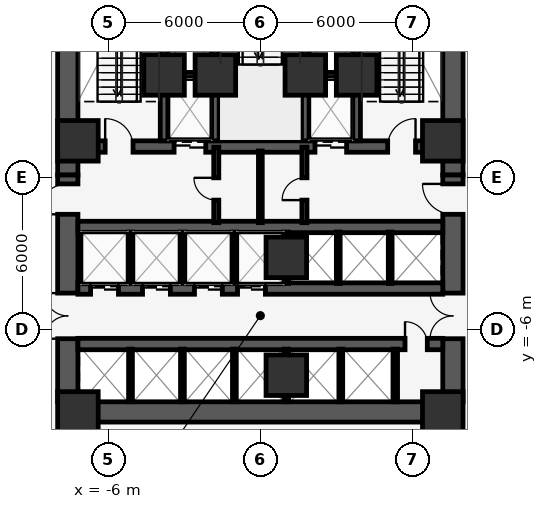
"""IFC4 building model, lengths in metres.
Left out: names, types, materials, properties, quantities, classifications, styles, units other than length and angle.
Written with IfcOpenShell. Run it as: python <this file> out.ifc"""

import sys

from ifc_helpers import new_model, si_unit, direction, frame, frame_2d, origin, origin_2d, place, context, subcontext, project, spatial, rectangle, extrude, element, fill, save


model = new_model("IFC4")
c1 = context("Model", 3, precision=1e-05, world=origin(), true_north=direction((0.0, 1.0)))
c2 = subcontext(c1, "Body", "Model", "MODEL_VIEW")
j1 = project(units=[si_unit("LENGTHUNIT", "METRE"), si_unit("PLANEANGLEUNIT", "RADIAN")], contexts=[c1])
p1 = place(None, origin())
s1 = spatial("IfcSite", under=j1, at=p1, CompositionType="ELEMENT")
p2 = place(p1, origin())
s2 = spatial("IfcBuilding", under=s1, at=p2, CompositionType="ELEMENT")
p3 = place(p2, frame((0.0, 0.0, 34.4)))
s3 = spatial("IfcBuildingStorey", under=s2, at=p3, CompositionType="ELEMENT", Elevation=34.4)
p4 = place(p3, frame((-7.2, 1.225, 0.0), z_axis=(0.0, 0.0, 1.0), x_axis=(1.0, 0.0, 0.0)))
e1 = element("IfcWall", 1, at=p4, inside=s3, PredefinedType="SHEAR", context=c2, shape_type="SweptSolid", body=[
    extrude(rectangle(XDim=14.4, YDim=0.45, at=frame_2d((7.2, 0.0))), origin(), (0.0, 0.0, 1.0), 3.75),
])
p5 = place(p4, frame((3.795, 0.0, 0.0)))
e2 = element("IfcOpeningElement", 2, at=p5, cuts=e1, PredefinedType="OPENING", context=c2, shape_type="SweptSolid", body=[
    extrude(rectangle(XDim=1.25, YDim=2.25, at=frame_2d((0.625, 1.125))), frame((0.0, 0.235, 0.0), z_axis=(0.0, -1.0, 0.0), x_axis=(1.0, 0.0, 0.0)), (0.0, 0.0, 1.0), 0.47),
])
p6 = place(p4, frame((9.355, 0.0, 0.0)))
e3 = element("IfcOpeningElement", 3, at=p6, cuts=e1, PredefinedType="OPENING", context=c2, shape_type="SweptSolid", body=[
    extrude(rectangle(XDim=1.25, YDim=2.25, at=frame_2d((0.625, 1.125))), frame((0.0, 0.235, 0.0), z_axis=(0.0, -1.0, 0.0), x_axis=(1.0, 0.0, 0.0)), (0.0, 0.0, 1.0), 0.47),
])
p7 = place(p4, frame((1.075, 0.0, 0.0)))
e4 = element("IfcOpeningElement", 4, at=p7, cuts=e1, PredefinedType="OPENING", context=c2, shape_type="SweptSolid", body=[
    extrude(rectangle(XDim=1.1, YDim=2.15, at=frame_2d((0.55, 1.075))), frame((0.0, 0.235, 0.0), z_axis=(0.0, -1.0, 0.0), x_axis=(1.0, 0.0, 0.0)), (0.0, 0.0, 1.0), 0.47),
])
p8 = place(p4, frame((12.225, 0.0, 0.0)))
e5 = element("IfcOpeningElement", 5, at=p8, cuts=e1, PredefinedType="OPENING", context=c2, shape_type="SweptSolid", body=[
    extrude(rectangle(XDim=1.1, YDim=2.15, at=frame_2d((0.55, 1.075))), frame((0.0, 0.235, 0.0), z_axis=(0.0, -1.0, 0.0), x_axis=(1.0, 0.0, 0.0)), (0.0, 0.0, 1.0), 0.47),
])
for number, where, z_axis, x_axis in (
    (6, (-3.8, 1.45, 0.0), (0.0, 0.0, 1.0), (0.0, 1.0, 0.0)),
    (7, (-1.775, 1.45, 0.0), (0.0, 0.0, 1.0), (0.0, 1.0, 0.0)),
    (8, (1.775, 1.45, 0.0), (0.0, 0.0, 1.0), (0.0, 1.0, 0.0)),
    (9, (3.8, 1.45, 0.0), (0.0, 0.0, 1.0), (0.0, 1.0, 0.0)),
):
    element("IfcWall", number, at=place(p3, frame(where, z_axis=z_axis, x_axis=x_axis)), inside=s3, PredefinedType="SHEAR", context=c2, shape_type="SweptSolid", body=[
        extrude(rectangle(XDim=7.7, YDim=0.3, at=frame_2d((3.85, 0.0))), origin(), (0.0, 0.0, 1.0), 3.75),
    ])
for number, where, z_axis, x_axis in (
    (10, (-7.6, 0.1, 0.0), (0.0, 0.0, 1.0), (0.0, 1.0, 0.0)),
    (11, (7.6, 0.1, 0.0), (0.0, 0.0, 1.0), (0.0, 1.0, 0.0)),
):
    element("IfcWall", number, at=place(p3, frame(where, z_axis=z_axis, x_axis=x_axis)), inside=s3, PredefinedType="SHEAR", context=c2, shape_type="SweptSolid", body=[
        extrude(rectangle(XDim=9.05, YDim=0.8, at=frame_2d((4.525, 0.0))), origin(), (0.0, 0.0, 1.0), 3.75),
    ])
p9 = place(p3, frame((-7.6, -8.85, 0.0), z_axis=(0.0, 0.0, 1.0), x_axis=(0.0, 1.0, 0.0)))
e12 = element("IfcWall", 12, at=p9, inside=s3, PredefinedType="SHEAR", context=c2, shape_type="SweptSolid", body=[
    extrude(rectangle(XDim=8.95, YDim=0.8, at=frame_2d((4.475, 0.0))), origin(), (0.0, 0.0, 1.0), 3.75),
])
p10 = place(p9, frame((2.49, 0.0, 0.0)))
e13 = element("IfcOpeningElement", 13, at=p10, cuts=e12, PredefinedType="OPENING", context=c2, shape_type="SweptSolid", body=[
    extrude(rectangle(XDim=1.8, YDim=2.2, at=frame_2d((0.9, 1.1))), frame((0.0, 0.41, 0.0), z_axis=(0.0, -1.0, 0.0), x_axis=(1.0, 0.0, 0.0)), (0.0, 0.0, 1.0), 0.82),
])
p11 = place(p9, frame((7.4, 0.0, 0.0)))
e14 = element("IfcOpeningElement", 14, at=p11, cuts=e12, PredefinedType="OPENING", context=c2, shape_type="SweptSolid", body=[
    extrude(rectangle(XDim=1.2, YDim=2.15, at=frame_2d((0.6, 1.075))), frame((0.0, 0.41, 0.0), z_axis=(0.0, -1.0, 0.0), x_axis=(1.0, 0.0, 0.0)), (0.0, 0.0, 1.0), 0.82),
])
p12 = place(p3, frame((7.6, -8.85, 0.0), z_axis=(0.0, 0.0, 1.0), x_axis=(0.0, 1.0, 0.0)))
e15 = element("IfcWall", 15, at=p12, inside=s3, PredefinedType="SHEAR", context=c2, shape_type="SweptSolid", body=[
    extrude(rectangle(XDim=8.95, YDim=0.8, at=frame_2d((4.475, 0.0))), origin(), (0.0, 0.0, 1.0), 3.75),
])
p13 = place(p12, frame((2.49, 0.0, 0.0)))
e16 = element("IfcOpeningElement", 16, at=p13, cuts=e15, PredefinedType="OPENING", context=c2, shape_type="SweptSolid", body=[
    extrude(rectangle(XDim=1.8, YDim=2.2, at=frame_2d((0.9, 1.1))), frame((0.0, 0.41, 0.0), z_axis=(0.0, -1.0, 0.0), x_axis=(1.0, 0.0, 0.0)), (0.0, 0.0, 1.0), 0.82),
])
p14 = place(p12, frame((7.4, 0.0, 0.0)))
e17 = element("IfcOpeningElement", 17, at=p14, cuts=e15, PredefinedType="OPENING", context=c2, shape_type="SweptSolid", body=[
    extrude(rectangle(XDim=1.2, YDim=2.15, at=frame_2d((0.6, 1.075))), frame((0.0, 0.41, 0.0), z_axis=(0.0, -1.0, 0.0), x_axis=(1.0, 0.0, 0.0)), (0.0, 0.0, 1.0), 0.82),
])
p15 = place(p3, frame((-7.6, -9.25, 0.0), z_axis=(0.0, 0.0, 1.0), x_axis=(1.0, 0.0, 0.0)))
e18 = element("IfcWall", 18, at=p15, inside=s3, PredefinedType="SHEAR", context=c2, shape_type="SweptSolid", body=[
    extrude(rectangle(XDim=15.2, YDim=0.8, at=frame_2d((7.6, 0.0))), origin(), (0.0, 0.0, 1.0), 3.75),
])
p16 = place(p3, frame((-7.2, -1.95, 0.0), z_axis=(0.0, 0.0, 1.0), x_axis=(1.0, 0.0, 0.0)))
e19 = element("IfcWall", 19, at=p16, inside=s3, PredefinedType="SHEAR", context=c2, shape_type="SweptSolid", body=[
    extrude(rectangle(XDim=14.4, YDim=0.45, at=frame_2d((7.2, 0.0))), origin(), (0.0, 0.0, 1.0), 3.75),
])
p17 = place(p3, frame((-7.2, -4.38, 0.0), z_axis=(0.0, 0.0, 1.0), x_axis=(1.0, 0.0, 0.0)))
e20 = element("IfcWall", 20, at=p17, inside=s3, PredefinedType="SHEAR", context=c2, shape_type="SweptSolid", body=[
    extrude(rectangle(XDim=14.4, YDim=0.45, at=frame_2d((7.2, 0.0))), origin(), (0.0, 0.0, 1.0), 3.75),
])
p18 = place(p17, frame((0.5, 0.0, 0.0)))
e21 = element("IfcOpeningElement", 21, at=p18, cuts=e20, PredefinedType="OPENING", context=c2, shape_type="SweptSolid", body=[
    extrude(rectangle(XDim=1.1, YDim=2.2, at=frame_2d((0.55, 1.1))), frame((0.0, 0.235, 0.0), z_axis=(0.0, -1.0, 0.0), x_axis=(1.0, 0.0, 0.0)), (0.0, 0.0, 1.0), 0.47),
])
p19 = place(p17, frame((2.55, 0.0, 0.0)))
e22 = element("IfcOpeningElement", 22, at=p19, cuts=e20, PredefinedType="OPENING", context=c2, shape_type="SweptSolid", body=[
    extrude(rectangle(XDim=1.1, YDim=2.2, at=frame_2d((0.55, 1.1))), frame((0.0, 0.235, 0.0), z_axis=(0.0, -1.0, 0.0), x_axis=(1.0, 0.0, 0.0)), (0.0, 0.0, 1.0), 0.47),
])
p20 = place(p17, frame((4.6, 0.0, 0.0)))
e23 = element("IfcOpeningElement", 23, at=p20, cuts=e20, PredefinedType="OPENING", context=c2, shape_type="SweptSolid", body=[
    extrude(rectangle(XDim=1.1, YDim=2.2, at=frame_2d((0.55, 1.1))), frame((0.0, 0.235, 0.0), z_axis=(0.0, -1.0, 0.0), x_axis=(1.0, 0.0, 0.0)), (0.0, 0.0, 1.0), 0.47),
])
p21 = place(p17, frame((6.3, 0.0, 0.0)))
e24 = element("IfcOpeningElement", 24, at=p21, cuts=e20, PredefinedType="OPENING", context=c2, shape_type="SweptSolid", body=[
    extrude(rectangle(XDim=1.1, YDim=2.2, at=frame_2d((0.55, 1.1))), frame((0.0, 0.235, 0.0), z_axis=(0.0, -1.0, 0.0), x_axis=(1.0, 0.0, 0.0)), (0.0, 0.0, 1.0), 0.47),
])
p22 = place(p3, frame((-7.2, -6.57, 0.0), z_axis=(0.0, 0.0, 1.0), x_axis=(1.0, 0.0, 0.0)))
e25 = element("IfcWall", 25, at=p22, inside=s3, PredefinedType="SHEAR", context=c2, shape_type="SweptSolid", body=[
    extrude(rectangle(XDim=14.4, YDim=0.45, at=frame_2d((7.2, 0.0))), origin(), (0.0, 0.0, 1.0), 3.75),
])
p23 = place(p22, frame((12.91, 0.0, 0.0)))
e26 = element("IfcOpeningElement", 26, at=p23, cuts=e25, PredefinedType="OPENING", context=c2, shape_type="SweptSolid", body=[
    extrude(rectangle(XDim=0.88, YDim=2.15, at=frame_2d((0.44, 1.075))), frame((0.0, 0.235, 0.0), z_axis=(0.0, -1.0, 0.0), x_axis=(1.0, 0.0, 0.0)), (0.0, 0.0, 1.0), 0.47),
])
for number, where, z_axis, x_axis in (
    (27, (-7.2, -9.25, 0.0), (0.0, 0.0, 1.0), (1.0, 0.0, 0.0)),
    (28, (7.2, -9.25, 0.0), (0.0, 0.0, 1.0), (1.0, 0.0, 0.0)),
    (29, (7.2, 1.45, 0.0), (0.0, 0.0, 1.0), (1.0, 0.0, 0.0)),
    (30, (-7.2, 1.45, 0.0), (0.0, 0.0, 1.0), (1.0, 0.0, 0.0)),
    (31, (-3.8, 4.05, 0.0), (0.0, 0.0, 1.0), (1.0, 0.0, 0.0)),
    (32, (3.8, 4.05, 0.0), (0.0, 0.0, 1.0), (1.0, 0.0, 0.0)),
    (33, (-1.775, 4.05, 0.0), (0.0, 0.0, 1.0), (1.0, 0.0, 0.0)),
    (34, (1.775, 4.05, 0.0), (0.0, 0.0, 1.0), (1.0, 0.0, 0.0)),
    (35, (1.025, -3.15, 0.0), (0.0, 0.0, 1.0), (1.0, 0.0, 0.0)),
    (36, (1.025, -7.8, 0.0), (0.0, 0.0, 1.0), (1.0, 0.0, 0.0)),
):
    element("IfcColumn", number, at=place(p3, frame(where, z_axis=z_axis, x_axis=x_axis)), inside=s3, PredefinedType="COLUMN", context=c2, shape_type="SweptSolid", body=[
        extrude(rectangle(XDim=1.6, YDim=1.6, at=origin_2d()), origin(), (0.0, 0.0, 1.0), 4.0),
    ])
p24 = place(p3, frame((4.923, 41.122, 0.0), z_axis=(0.0, 0.0, 1.0), x_axis=(0.504213113214, -0.863579258935, 0.0)))
e37 = element("IfcWall", 37, at=p24, inside=s3, PredefinedType="STANDARD", context=c2, shape_type="SweptSolid", body=[
    extrude(rectangle(XDim=67.041, YDim=0.32, at=frame_2d((33.521, 0.0))), origin(), (0.0, 0.0, 1.0), 3.75),
])
p25 = place(p24, frame((33.021, 0.0, 0.0)))
e38 = element("IfcOpeningElement", 38, at=p25, cuts=e37, PredefinedType="OPENING", context=c2, shape_type="SweptSolid", body=[
    extrude(rectangle(XDim=1.0, YDim=2.15, at=frame_2d((0.5, 1.075))), frame((0.0, 0.17, 0.0), z_axis=(0.0, -1.0, 0.0), x_axis=(1.0, 0.0, 0.0)), (0.0, 0.0, 1.0), 0.34),
])
p26 = place(p3, frame((-38.726, -16.773, 0.0), z_axis=(0.0, 0.0, 1.0), x_axis=(0.504213113214, 0.863579258935, 0.0)))
e39 = element("IfcWall", 39, at=p26, inside=s3, PredefinedType="STANDARD", context=c2, shape_type="SweptSolid", body=[
    extrude(rectangle(XDim=67.041, YDim=0.32, at=frame_2d((33.521, 0.0))), origin(), (0.0, 0.0, 1.0), 3.75),
])
p27 = place(p26, frame((33.021, 0.0, 0.0)))
e40 = element("IfcOpeningElement", 40, at=p27, cuts=e39, PredefinedType="OPENING", context=c2, shape_type="SweptSolid", body=[
    extrude(rectangle(XDim=1.0, YDim=2.15, at=frame_2d((0.5, 1.075))), frame((0.0, 0.17, 0.0), z_axis=(0.0, -1.0, 0.0), x_axis=(1.0, 0.0, 0.0)), (0.0, 0.0, 1.0), 0.34),
])
for number, where, z_axis, x_axis in (
    (41, (-3.65, 4.05, 0.0), (0.0, 0.0, 1.0), (1.0, 0.0, 0.0)),
    (42, (1.92, 4.05, 0.0), (0.0, 0.0, 1.0), (1.0, 0.0, 0.0)),
):
    element("IfcWall", number, at=place(p3, frame(where, z_axis=z_axis, x_axis=x_axis)), inside=s3, PredefinedType="PARTITIONING", context=c2, shape_type="SweptSolid", body=[
        extrude(rectangle(XDim=1.73, YDim=0.2, at=frame_2d((0.865, 0.0))), origin(), (0.0, 0.0, 1.0), 3.75),
    ])
for number, where, z_axis, x_axis in (
    (43, (-5.125, -4.18, 0.0), (0.0, 0.0, 1.0), (0.0, 1.0, 0.0)),
    (44, (-3.075, -4.18, 0.0), (0.0, 0.0, 1.0), (0.0, 1.0, 0.0)),
    (45, (-1.025, -4.18, 0.0), (0.0, 0.0, 1.0), (0.0, 1.0, 0.0)),
):
    element("IfcWall", number, at=place(p3, frame(where, z_axis=z_axis, x_axis=x_axis)), inside=s3, PredefinedType="PARTITIONING", context=c2, shape_type="SweptSolid", body=[
        extrude(rectangle(XDim=2.03, YDim=0.15, at=frame_2d((1.015, 0.0))), origin(), (0.0, 0.0, 1.0), 3.75),
    ])
p28 = place(p3, frame((1.025, -4.18, 0.0), z_axis=(0.0, 0.0, 1.0), x_axis=(0.0, 1.0, 0.0)))
e46 = element("IfcWall", 46, at=p28, inside=s3, PredefinedType="PARTITIONING", context=c2, shape_type="SweptSolid", body=[
    extrude(rectangle(XDim=2.03, YDim=0.18, at=frame_2d((1.015, 0.0))), origin(), (0.0, 0.0, 1.0), 2.798),
])
for number, where, z_axis, x_axis in (
    (47, (3.075, -4.18, 0.0), (0.0, 0.0, 1.0), (0.0, 1.0, 0.0)),
    (48, (5.125, -4.18, 0.0), (0.0, 0.0, 1.0), (0.0, 1.0, 0.0)),
):
    element("IfcWall", number, at=place(p3, frame(where, z_axis=z_axis, x_axis=x_axis)), inside=s3, PredefinedType="PARTITIONING", context=c2, shape_type="SweptSolid", body=[
        extrude(rectangle(XDim=2.03, YDim=0.15, at=frame_2d((1.015, 0.0))), origin(), (0.0, 0.0, 1.0), 3.75),
    ])
for number, where, z_axis, x_axis in (
    (49, (-5.125, -8.85, 0.0), (0.0, 0.0, 1.0), (0.0, 1.0, 0.0)),
    (50, (-3.075, -8.85, 0.0), (0.0, 0.0, 1.0), (0.0, 1.0, 0.0)),
    (51, (-1.025, -8.85, 0.0), (0.0, 0.0, 1.0), (0.0, 1.0, 0.0)),
):
    element("IfcWall", number, at=place(p3, frame(where, z_axis=z_axis, x_axis=x_axis)), inside=s3, PredefinedType="PARTITIONING", context=c2, shape_type="SweptSolid", body=[
        extrude(rectangle(XDim=2.08, YDim=0.15, at=frame_2d((1.04, 0.0))), origin(), (0.0, 0.0, 1.0), 3.75),
    ])
p29 = place(p3, frame((1.025, -8.85, 0.0), z_axis=(0.0, 0.0, 1.0), x_axis=(0.0, 1.0, 0.0)))
e52 = element("IfcWall", 52, at=p29, inside=s3, PredefinedType="PARTITIONING", context=c2, shape_type="SweptSolid", body=[
    extrude(rectangle(XDim=2.08, YDim=0.18, at=frame_2d((1.04, 0.0))), origin(), (0.0, 0.0, 1.0), 2.798),
])
p30 = place(p3, frame((3.175, -8.85, 0.0), z_axis=(0.0, 0.0, 1.0), x_axis=(0.0, 1.0, 0.0)))
e53 = element("IfcWall", 53, at=p30, inside=s3, PredefinedType="PARTITIONING", context=c2, shape_type="SweptSolid", body=[
    extrude(rectangle(XDim=2.08, YDim=0.15, at=frame_2d((1.04, 0.0))), origin(), (0.0, 0.0, 1.0), 3.75),
])
p31 = place(p3, frame((5.325, -8.85, 0.0), z_axis=(0.0, 0.0, 1.0), x_axis=(0.0, 1.0, 0.0)))
e54 = element("IfcWall", 54, at=p31, inside=s3, PredefinedType="PARTITIONING", context=c2, shape_type="SweptSolid", body=[
    extrude(rectangle(XDim=2.08, YDim=0.18, at=frame_2d((1.04, 0.0))), origin(), (0.0, 0.0, 1.0), 3.75),
])
p32 = place(p3, frame((-1.74, -1.78, 0.0), z_axis=(0.0, 0.0, 1.0), x_axis=(0.0, 1.0, 0.0)))
e55 = element("IfcWall", 55, at=p32, inside=s3, PredefinedType="PARTITIONING", context=c2, shape_type="SweptSolid", body=[
    extrude(rectangle(XDim=2.98, YDim=0.2, at=frame_2d((1.49, 0.0))), origin(), (0.0, 0.0, 1.0), 3.75),
])
p33 = place(p32, frame((0.89, 0.0, 0.0)))
e56 = element("IfcOpeningElement", 56, at=p33, cuts=e55, PredefinedType="OPENING", context=c2, shape_type="SweptSolid", body=[
    extrude(rectangle(XDim=0.88, YDim=2.15, at=frame_2d((0.44, 1.075))), frame((0.0, 0.11, 0.0), z_axis=(0.0, -1.0, 0.0), x_axis=(1.0, 0.0, 0.0)), (0.0, 0.0, 1.0), 0.22),
])
p34 = place(p3, frame((1.74, -1.78, 0.0), z_axis=(0.0, 0.0, 1.0), x_axis=(0.0, 1.0, 0.0)))
e57 = element("IfcWall", 57, at=p34, inside=s3, PredefinedType="PARTITIONING", context=c2, shape_type="SweptSolid", body=[
    extrude(rectangle(XDim=2.98, YDim=0.2, at=frame_2d((1.49, 0.0))), origin(), (0.0, 0.0, 1.0), 3.75),
])
p35 = place(p34, frame((0.89, 0.0, 0.0)))
e58 = element("IfcOpeningElement", 58, at=p35, cuts=e57, PredefinedType="OPENING", context=c2, shape_type="SweptSolid", body=[
    extrude(rectangle(XDim=0.88, YDim=2.15, at=frame_2d((0.44, 1.075))), frame((0.0, 0.11, 0.0), z_axis=(0.0, -1.0, 0.0), x_axis=(1.0, 0.0, 0.0)), (0.0, 0.0, 1.0), 0.22),
])
p36 = place(p3, frame((0.0, -1.78, 0.0), z_axis=(0.0, 0.0, 1.0), x_axis=(0.0, 1.0, 0.0)))
e59 = element("IfcWall", 59, at=p36, inside=s3, PredefinedType="PARTITIONING", context=c2, shape_type="SweptSolid", body=[
    extrude(rectangle(XDim=2.83, YDim=0.15, at=frame_2d((1.415, 0.0))), origin(), (0.0, 0.0, 1.0), 3.75),
])
p37 = place(p18, origin())
e60 = element("IfcDoor", 60, at=p37, inside=s3, OperationType="DOUBLE_DOOR_SLIDING", PredefinedType="DOOR", context=c2, shape_type="SweptSolid", body=[
    extrude(rectangle(XDim=1.1, YDim=2.2, at=frame_2d((0.55, 1.1))), frame((0.0, 0.025, 0.0), z_axis=(0.0, -1.0, 0.0), x_axis=(1.0, 0.0, 0.0)), (0.0, 0.0, 1.0), 0.05),
])
fill(e21, e60)
p38 = place(p19, origin())
e61 = element("IfcDoor", 61, at=p38, inside=s3, OperationType="DOUBLE_DOOR_SLIDING", PredefinedType="DOOR", context=c2, shape_type="SweptSolid", body=[
    extrude(rectangle(XDim=1.1, YDim=2.2, at=frame_2d((0.55, 1.1))), frame((0.0, 0.025, 0.0), z_axis=(0.0, -1.0, 0.0), x_axis=(1.0, 0.0, 0.0)), (0.0, 0.0, 1.0), 0.05),
])
fill(e22, e61)
p39 = place(p20, origin())
e62 = element("IfcDoor", 62, at=p39, inside=s3, OperationType="DOUBLE_DOOR_SLIDING", PredefinedType="DOOR", context=c2, shape_type="SweptSolid", body=[
    extrude(rectangle(XDim=1.1, YDim=2.2, at=frame_2d((0.55, 1.1))), frame((0.0, 0.025, 0.0), z_axis=(0.0, -1.0, 0.0), x_axis=(1.0, 0.0, 0.0)), (0.0, 0.0, 1.0), 0.05),
])
fill(e23, e62)
p40 = place(p21, origin())
e63 = element("IfcDoor", 63, at=p40, inside=s3, OperationType="DOUBLE_DOOR_SLIDING", PredefinedType="DOOR", context=c2, shape_type="SweptSolid", body=[
    extrude(rectangle(XDim=1.1, YDim=2.2, at=frame_2d((0.55, 1.1))), frame((0.0, 0.025, 0.0), z_axis=(0.0, -1.0, 0.0), x_axis=(1.0, 0.0, 0.0)), (0.0, 0.0, 1.0), 0.05),
])
fill(e24, e63)
p41 = place(p5, origin())
e64 = element("IfcDoor", 64, at=p41, inside=s3, OperationType="DOUBLE_DOOR_SLIDING", PredefinedType="DOOR", context=c2, shape_type="SweptSolid", body=[
    extrude(rectangle(XDim=1.25, YDim=2.25, at=frame_2d((0.625, 1.125))), frame((0.0, 0.025, 0.0), z_axis=(0.0, -1.0, 0.0), x_axis=(1.0, 0.0, 0.0)), (0.0, 0.0, 1.0), 0.05),
])
fill(e2, e64)
p42 = place(p6, origin())
e65 = element("IfcDoor", 65, at=p42, inside=s3, OperationType="DOUBLE_DOOR_SLIDING", PredefinedType="DOOR", context=c2, shape_type="SweptSolid", body=[
    extrude(rectangle(XDim=1.25, YDim=2.25, at=frame_2d((0.625, 1.125))), frame((0.0, 0.025, 0.0), z_axis=(0.0, -1.0, 0.0), x_axis=(1.0, 0.0, 0.0)), (0.0, 0.0, 1.0), 0.05),
])
fill(e3, e65)
p43 = place(p7, origin())
e66 = element("IfcDoor", 66, at=p43, inside=s3, OperationType="SINGLE_SWING_LEFT", PredefinedType="DOOR", context=c2, shape_type="SweptSolid", body=[
    extrude(rectangle(XDim=1.1, YDim=2.15, at=frame_2d((0.55, 1.075))), frame((0.0, 0.025, 0.0), z_axis=(0.0, -1.0, 0.0), x_axis=(1.0, 0.0, 0.0)), (0.0, 0.0, 1.0), 0.05),
])
fill(e4, e66)
p44 = place(p8, origin())
e67 = element("IfcDoor", 67, at=p44, inside=s3, OperationType="SINGLE_SWING_RIGHT", PredefinedType="DOOR", context=c2, shape_type="SweptSolid", body=[
    extrude(rectangle(XDim=1.1, YDim=2.15, at=frame_2d((0.55, 1.075))), frame((0.0, 0.025, 0.0), z_axis=(0.0, -1.0, 0.0), x_axis=(1.0, 0.0, 0.0)), (0.0, 0.0, 1.0), 0.05),
])
fill(e5, e67)
p45 = place(p10, origin())
e68 = element("IfcDoor", 68, at=p45, inside=s3, OperationType="DOUBLE_DOOR_SINGLE_SWING", PredefinedType="DOOR", context=c2, shape_type="SweptSolid", body=[
    extrude(rectangle(XDim=1.8, YDim=2.2, at=frame_2d((0.9, 1.1))), frame((0.0, 0.025, 0.0), z_axis=(0.0, -1.0, 0.0), x_axis=(1.0, 0.0, 0.0)), (0.0, 0.0, 1.0), 0.05),
])
fill(e13, e68)
p46 = place(p11, origin())
e69 = element("IfcDoor", 69, at=p46, inside=s3, OperationType="SINGLE_SWING_LEFT", PredefinedType="DOOR", context=c2, shape_type="SweptSolid", body=[
    extrude(rectangle(XDim=1.2, YDim=2.15, at=frame_2d((0.6, 1.075))), frame((0.0, 0.025, 0.0), z_axis=(0.0, -1.0, 0.0), x_axis=(1.0, 0.0, 0.0)), (0.0, 0.0, 1.0), 0.05),
])
fill(e14, e69)
p47 = place(p13, origin())
e70 = element("IfcDoor", 70, at=p47, inside=s3, OperationType="DOUBLE_DOOR_SINGLE_SWING", PredefinedType="DOOR", context=c2, shape_type="SweptSolid", body=[
    extrude(rectangle(XDim=1.8, YDim=2.2, at=frame_2d((0.9, 1.1))), frame((0.0, 0.025, 0.0), z_axis=(0.0, -1.0, 0.0), x_axis=(1.0, 0.0, 0.0)), (0.0, 0.0, 1.0), 0.05),
])
fill(e16, e70)
p48 = place(p14, origin())
e71 = element("IfcDoor", 71, at=p48, inside=s3, OperationType="SINGLE_SWING_RIGHT", PredefinedType="DOOR", context=c2, shape_type="SweptSolid", body=[
    extrude(rectangle(XDim=1.2, YDim=2.15, at=frame_2d((0.6, 1.075))), frame((0.0, 0.025, 0.0), z_axis=(0.0, -1.0, 0.0), x_axis=(1.0, 0.0, 0.0)), (0.0, 0.0, 1.0), 0.05),
])
fill(e17, e71)
p49 = place(p23, origin())
e72 = element("IfcDoor", 72, at=p49, inside=s3, OperationType="SINGLE_SWING_LEFT", PredefinedType="DOOR", context=c2, shape_type="SweptSolid", body=[
    extrude(rectangle(XDim=0.88, YDim=2.15, at=frame_2d((0.44, 1.075))), frame((0.0, 0.025, 0.0), z_axis=(0.0, -1.0, 0.0), x_axis=(1.0, 0.0, 0.0)), (0.0, 0.0, 1.0), 0.05),
])
fill(e26, e72)
p50 = place(p33, origin())
e73 = element("IfcDoor", 73, at=p50, inside=s3, OperationType="SINGLE_SWING_RIGHT", PredefinedType="DOOR", context=c2, shape_type="SweptSolid", body=[
    extrude(rectangle(XDim=0.88, YDim=2.15, at=frame_2d((0.44, 1.075))), frame((0.0, 0.025, 0.0), z_axis=(0.0, -1.0, 0.0), x_axis=(1.0, 0.0, 0.0)), (0.0, 0.0, 1.0), 0.05),
])
fill(e56, e73)
p51 = place(p35, origin())
e74 = element("IfcDoor", 74, at=p51, inside=s3, OperationType="SINGLE_SWING_LEFT", PredefinedType="DOOR", context=c2, shape_type="SweptSolid", body=[
    extrude(rectangle(XDim=0.88, YDim=2.15, at=frame_2d((0.44, 1.075))), frame((0.0, 0.025, 0.0), z_axis=(0.0, -1.0, 0.0), x_axis=(1.0, 0.0, 0.0)), (0.0, 0.0, 1.0), 0.05),
])
fill(e58, e74)
save(model, sys.argv[1])
